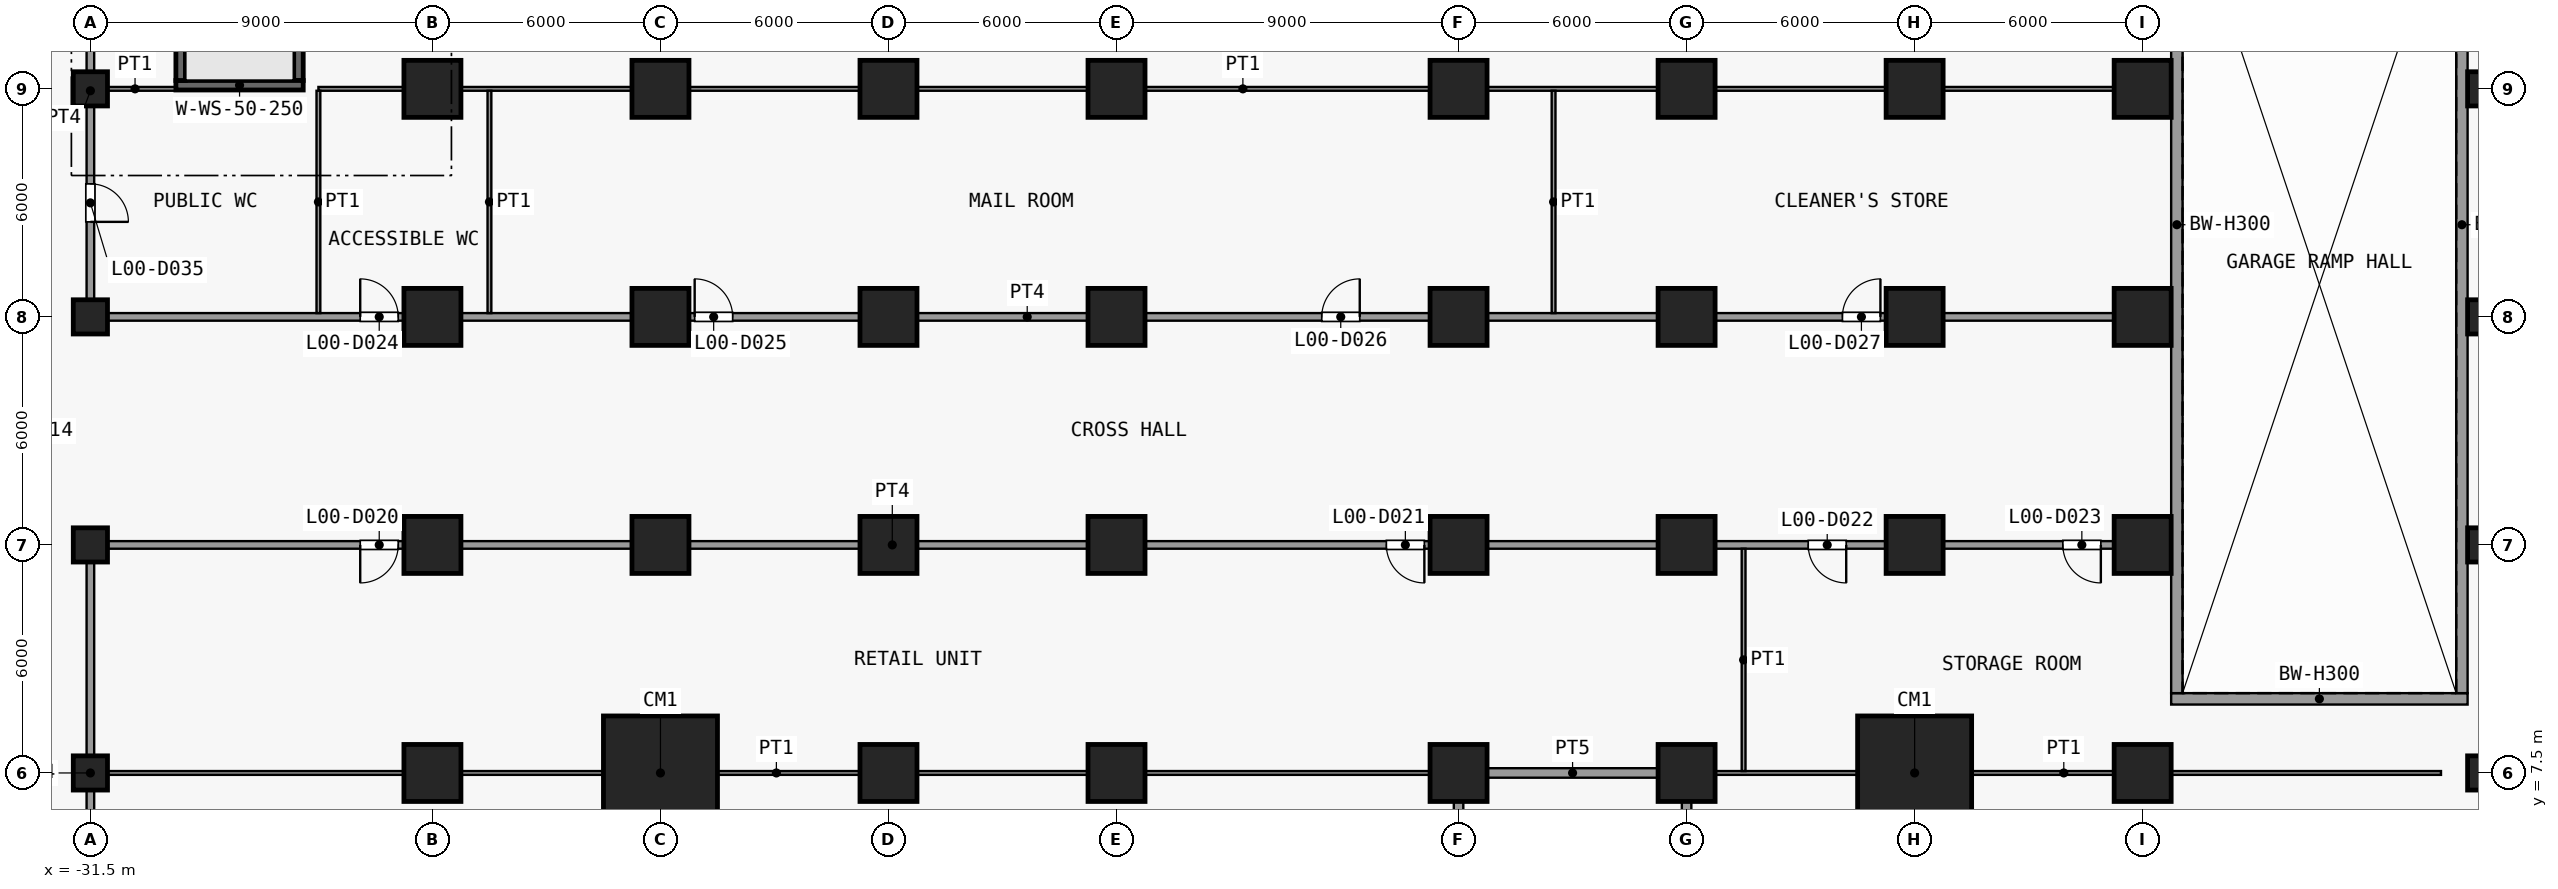
"""IFC4 building model, lengths in metres.
Left out: names, types, materials, properties, quantities, classifications, styles, units other than length and angle.
Written with IfcOpenShell. Run it as: python <this file> out.ifc"""

import sys

from ifc_helpers import new_model, si_unit, direction, frame, frame_2d, origin, origin_2d, place, context, subcontext, project, spatial, rectangle, extrude, element, fill, save


model = new_model("IFC4")
c1 = context("Model", 3, precision=1e-05, world=origin(), true_north=direction((0.0, 1.0)))
c2 = subcontext(c1, "Body", "Model", "MODEL_VIEW")
j1 = project(units=[si_unit("LENGTHUNIT", "METRE"), si_unit("PLANEANGLEUNIT", "RADIAN")], contexts=[c1])
p1 = place(None, origin())
s1 = spatial("IfcSite", under=j1, at=p1, CompositionType="ELEMENT")
p2 = place(p1, origin())
s2 = spatial("IfcBuilding", under=s1, at=p2, CompositionType="ELEMENT")
p3 = place(p2, origin())
s3 = spatial("IfcBuildingStorey", under=s2, at=p3, CompositionType="ELEMENT", Elevation=0.0)
for number, where, z_axis, x_axis in (
    (1, (-31.5, 7.5, 0.0), (0.0, 0.0, 1.0), (1.0, 0.0, 0.0)),
    (2, (-31.5, 13.5, 0.0), (0.0, 0.0, 1.0), (1.0, 0.0, 0.0)),
    (3, (-31.5, 19.5, 0.0), (0.0, 0.0, 1.0), (1.0, 0.0, 0.0)),
    (4, (-31.5, 25.5, 0.0), (0.0, 0.0, 1.0), (1.0, 0.0, 0.0)),
):
    element("IfcColumn", number, at=place(p3, frame(where, z_axis=z_axis, x_axis=x_axis)), inside=s3, PredefinedType="COLUMN", context=c2, shape_type="SweptSolid", body=[
        extrude(rectangle(XDim=0.9, YDim=0.9, at=origin_2d()), origin(), (0.0, 0.0, 1.0), 8.0),
    ])
for number, where, z_axis, x_axis in (
    (5, (-22.5, 7.5, 0.0), (0.0, 0.0, 1.0), (1.0, 0.0, 0.0)),
    (6, (-22.5, 13.5, 0.0), (0.0, 0.0, 1.0), (1.0, 0.0, 0.0)),
    (7, (-22.5, 19.5, 0.0), (0.0, 0.0, 1.0), (1.0, 0.0, 0.0)),
    (8, (-22.5, 25.5, 0.0), (0.0, 0.0, 1.0), (1.0, 0.0, 0.0)),
):
    element("IfcColumn", number, at=place(p3, frame(where, z_axis=z_axis, x_axis=x_axis)), inside=s3, PredefinedType="COLUMN", context=c2, shape_type="SweptSolid", body=[
        extrude(rectangle(XDim=1.5, YDim=1.5, at=origin_2d()), origin(), (0.0, 0.0, 1.0), 8.0),
    ])
p4 = place(p3, frame((-16.5, 7.5, 0.0), z_axis=(0.0, 0.0, 1.0), x_axis=(1.0, 0.0, 0.0)))
e9 = element("IfcColumn", 9, at=p4, inside=s3, PredefinedType="COLUMN", context=c2, shape_type="SweptSolid", body=[
    extrude(rectangle(XDim=3.0, YDim=3.0, at=origin_2d()), origin(), (0.0, 0.0, 1.0), 8.0),
])
for number, where, z_axis, x_axis in (
    (10, (-16.5, 13.5, 0.0), (0.0, 0.0, 1.0), (1.0, 0.0, 0.0)),
    (11, (-16.5, 19.5, 0.0), (0.0, 0.0, 1.0), (1.0, 0.0, 0.0)),
    (12, (-16.5, 25.5, 0.0), (0.0, 0.0, 1.0), (1.0, 0.0, 0.0)),
    (13, (-10.5, 7.5, 0.0), (0.0, 0.0, 1.0), (1.0, 0.0, 0.0)),
    (14, (-10.5, 13.5, 0.0), (0.0, 0.0, 1.0), (1.0, 0.0, 0.0)),
    (15, (-10.5, 19.5, 0.0), (0.0, 0.0, 1.0), (1.0, 0.0, 0.0)),
    (16, (-10.5, 25.5, 0.0), (0.0, 0.0, 1.0), (1.0, 0.0, 0.0)),
    (17, (-4.5, 7.5, 0.0), (0.0, 0.0, 1.0), (1.0, 0.0, 0.0)),
    (18, (-4.5, 13.5, 0.0), (0.0, 0.0, 1.0), (1.0, 0.0, 0.0)),
    (19, (-4.5, 19.5, 0.0), (0.0, 0.0, 1.0), (1.0, 0.0, 0.0)),
    (20, (-4.5, 25.5, 0.0), (0.0, 0.0, 1.0), (1.0, 0.0, 0.0)),
    (21, (4.5, 7.5, 0.0), (0.0, 0.0, 1.0), (1.0, 0.0, 0.0)),
    (22, (4.5, 13.5, 0.0), (0.0, 0.0, 1.0), (1.0, 0.0, 0.0)),
    (23, (4.5, 19.5, 0.0), (0.0, 0.0, 1.0), (1.0, 0.0, 0.0)),
    (24, (4.5, 25.5, 0.0), (0.0, 0.0, 1.0), (1.0, 0.0, 0.0)),
    (25, (10.5, 7.5, 0.0), (0.0, 0.0, 1.0), (1.0, 0.0, 0.0)),
    (26, (10.5, 13.5, 0.0), (0.0, 0.0, 1.0), (1.0, 0.0, 0.0)),
    (27, (10.5, 19.5, 0.0), (0.0, 0.0, 1.0), (1.0, 0.0, 0.0)),
    (28, (10.5, 25.5, 0.0), (0.0, 0.0, 1.0), (1.0, 0.0, 0.0)),
):
    element("IfcColumn", number, at=place(p3, frame(where, z_axis=z_axis, x_axis=x_axis)), inside=s3, PredefinedType="COLUMN", context=c2, shape_type="SweptSolid", body=[
        extrude(rectangle(XDim=1.5, YDim=1.5, at=origin_2d()), origin(), (0.0, 0.0, 1.0), 8.0),
    ])
p5 = place(p3, frame((16.5, 7.5, 0.0), z_axis=(0.0, 0.0, 1.0), x_axis=(1.0, 0.0, 0.0)))
e29 = element("IfcColumn", 29, at=p5, inside=s3, PredefinedType="COLUMN", context=c2, shape_type="SweptSolid", body=[
    extrude(rectangle(XDim=3.0, YDim=3.0, at=origin_2d()), origin(), (0.0, 0.0, 1.0), 8.0),
])
for number, where, z_axis, x_axis in (
    (30, (16.5, 13.5, 0.0), (0.0, 0.0, 1.0), (1.0, 0.0, 0.0)),
    (31, (16.5, 19.5, 0.0), (0.0, 0.0, 1.0), (1.0, 0.0, 0.0)),
    (32, (16.5, 25.5, 0.0), (0.0, 0.0, 1.0), (1.0, 0.0, 0.0)),
    (33, (22.5, 7.5, 0.0), (0.0, 0.0, 1.0), (1.0, 0.0, 0.0)),
    (34, (22.5, 13.5, 0.0), (0.0, 0.0, 1.0), (1.0, 0.0, 0.0)),
    (35, (22.5, 19.5, 0.0), (0.0, 0.0, 1.0), (1.0, 0.0, 0.0)),
    (36, (22.5, 25.5, 0.0), (0.0, 0.0, 1.0), (1.0, 0.0, 0.0)),
):
    element("IfcColumn", number, at=place(p3, frame(where, z_axis=z_axis, x_axis=x_axis)), inside=s3, PredefinedType="COLUMN", context=c2, shape_type="SweptSolid", body=[
        extrude(rectangle(XDim=1.5, YDim=1.5, at=origin_2d()), origin(), (0.0, 0.0, 1.0), 8.0),
    ])
for number, where, z_axis, x_axis in (
    (37, (31.5, 7.5, 0.0), (0.0, 0.0, 1.0), (1.0, 0.0, 0.0)),
    (38, (31.5, 13.5, 0.0), (0.0, 0.0, 1.0), (1.0, 0.0, 0.0)),
    (39, (31.5, 19.5, 0.0), (0.0, 0.0, 1.0), (1.0, 0.0, 0.0)),
    (40, (31.5, 25.5, 0.0), (0.0, 0.0, 1.0), (1.0, 0.0, 0.0)),
):
    element("IfcColumn", number, at=place(p3, frame(where, z_axis=z_axis, x_axis=x_axis)), inside=s3, PredefinedType="COLUMN", context=c2, shape_type="SweptSolid", body=[
        extrude(rectangle(XDim=0.9, YDim=0.9, at=origin_2d()), origin(), (0.0, 0.0, 1.0), 8.0),
    ])
p6 = place(p3, frame((23.25, 9.45, 0.0), z_axis=(0.0, 0.0, 1.0), x_axis=(1.0, 0.0, 0.0)))
e41 = element("IfcWall", 41, at=p6, inside=s3, PredefinedType="SOLIDWALL", context=c2, shape_type="SweptSolid", body=[
    extrude(rectangle(XDim=7.8, YDim=0.3, at=frame_2d((3.9, 0.0))), origin(), (0.0, 0.0, 1.0), 7.65),
])
for number, where, z_axis, x_axis in (
    (42, (23.4, 9.6, 0.0), (0.0, 0.0, 1.0), (0.0, 1.0, 0.0)),
    (43, (30.9, 9.6, 0.0), (0.0, 0.0, 1.0), (0.0, 1.0, 0.0)),
):
    element("IfcWall", number, at=place(p3, frame(where, z_axis=z_axis, x_axis=x_axis)), inside=s3, PredefinedType="SOLIDWALL", context=c2, shape_type="SweptSolid", body=[
        extrude(rectangle(XDim=24.65, YDim=0.3, at=frame_2d((12.325, 0.0))), origin(), (0.0, 0.0, 1.0), 7.65),
    ])
for number, where, z_axis, x_axis in (
    (44, (-29.125, 25.72, 0.0), (0.0, 0.0, 1.0), (0.0, 1.0, 0.0)),
    (45, (-26.025, 25.72, 0.0), (0.0, 0.0, 1.0), (0.0, 1.0, 0.0)),
):
    element("IfcWall", number, at=place(p3, frame(where, z_axis=z_axis, x_axis=x_axis)), inside=s3, PredefinedType="SHEAR", context=c2, shape_type="SweptSolid", body=[
        extrude(rectangle(XDim=1.35, YDim=0.25, at=frame_2d((0.675, 0.0))), origin(), (0.0, 0.0, 1.0), 7.65),
    ])
p7 = place(p3, frame((-29.25, 25.595, 0.0), z_axis=(0.0, 0.0, 1.0), x_axis=(1.0, 0.0, 0.0)))
e46 = element("IfcWall", 46, at=p7, inside=s3, PredefinedType="SHEAR", context=c2, shape_type="SweptSolid", body=[
    extrude(rectangle(XDim=3.35, YDim=0.25, at=frame_2d((1.675, 0.0))), origin(), (0.0, 0.0, 1.0), 7.65),
])
p8 = place(p3, frame((-31.4, 7.5, 0.0), z_axis=(0.0, 0.0, 1.0), x_axis=(1.0, 0.0, 0.0)))
e47 = element("IfcWall", 47, at=p8, inside=s3, PredefinedType="PARTITIONING", context=c2, shape_type="SweptSolid", body=[
    extrude(rectangle(XDim=35.9, YDim=0.1, at=frame_2d((17.95, 0.0))), origin(), (0.0, 0.0, 1.0), 7.65),
])
p9 = place(p3, frame((10.5, 7.5, 0.0), z_axis=(0.0, 0.0, 1.0), x_axis=(1.0, 0.0, 0.0)))
e48 = element("IfcWall", 48, at=p9, inside=s3, PredefinedType="PARTITIONING", context=c2, shape_type="SweptSolid", body=[
    extrude(rectangle(XDim=19.85, YDim=0.1, at=frame_2d((9.925, 0.0))), origin(), (0.0, 0.0, 1.0), 7.65),
])
p10 = place(p3, frame((4.5, 7.5, 0.0), z_axis=(0.0, 0.0, 1.0), x_axis=(1.0, 0.0, 0.0)))
e49 = element("IfcWall", 49, at=p10, inside=s3, PredefinedType="PARTITIONING", context=c2, shape_type="SweptSolid", body=[
    extrude(rectangle(XDim=6.0, YDim=0.25, at=frame_2d((3.0, 0.0))), origin(), (0.0, 0.0, 1.0), 7.65),
])
p11 = place(p3, frame((-31.6, 13.5, 0.0), z_axis=(0.0, 0.0, 1.0), x_axis=(1.0, 0.0, 0.0)))
e50 = element("IfcWall", 50, at=p11, inside=s3, PredefinedType="PARTITIONING", context=c2, shape_type="SweptSolid", body=[
    extrude(rectangle(XDim=54.75, YDim=0.2, at=frame_2d((27.375, 0.0))), origin(), (0.0, 0.0, 1.0), 7.65),
])
p12 = place(p11, frame((7.2, 0.0, 0.0)))
e51 = element("IfcOpeningElement", 51, at=p12, cuts=e50, PredefinedType="OPENING", context=c2, shape_type="SweptSolid", body=[
    extrude(rectangle(XDim=1.0, YDim=2.1, at=frame_2d((0.5, 1.05))), frame((0.0, 0.11, 0.0), z_axis=(0.0, -1.0, 0.0), x_axis=(1.0, 0.0, 0.0)), (0.0, 0.0, 1.0), 0.22),
])
p13 = place(p11, frame((34.2, 0.0, 0.0)))
e52 = element("IfcOpeningElement", 52, at=p13, cuts=e50, PredefinedType="OPENING", context=c2, shape_type="SweptSolid", body=[
    extrude(rectangle(XDim=1.0, YDim=2.1, at=frame_2d((0.5, 1.05))), frame((0.0, 0.11, 0.0), z_axis=(0.0, -1.0, 0.0), x_axis=(1.0, 0.0, 0.0)), (0.0, 0.0, 1.0), 0.22),
])
p14 = place(p11, frame((45.3, 0.0, 0.0)))
e53 = element("IfcOpeningElement", 53, at=p14, cuts=e50, PredefinedType="OPENING", context=c2, shape_type="SweptSolid", body=[
    extrude(rectangle(XDim=1.0, YDim=2.1, at=frame_2d((0.5, 1.05))), frame((0.0, 0.11, 0.0), z_axis=(0.0, -1.0, 0.0), x_axis=(1.0, 0.0, 0.0)), (0.0, 0.0, 1.0), 0.22),
])
p15 = place(p11, frame((52.0, 0.0, 0.0)))
e54 = element("IfcOpeningElement", 54, at=p15, cuts=e50, PredefinedType="OPENING", context=c2, shape_type="SweptSolid", body=[
    extrude(rectangle(XDim=1.0, YDim=2.1, at=frame_2d((0.5, 1.05))), frame((0.0, 0.11, 0.0), z_axis=(0.0, -1.0, 0.0), x_axis=(1.0, 0.0, 0.0)), (0.0, 0.0, 1.0), 0.22),
])
p16 = place(p3, frame((-31.6, 19.5, 0.0), z_axis=(0.0, 0.0, 1.0), x_axis=(1.0, 0.0, 0.0)))
e55 = element("IfcWall", 55, at=p16, inside=s3, PredefinedType="PARTITIONING", context=c2, shape_type="SweptSolid", body=[
    extrude(rectangle(XDim=54.75, YDim=0.2, at=frame_2d((27.375, 0.0))), origin(), (0.0, 0.0, 1.0), 7.65),
])
p17 = place(p16, frame((7.2, 0.0, 0.0)))
e56 = element("IfcOpeningElement", 56, at=p17, cuts=e55, PredefinedType="OPENING", context=c2, shape_type="SweptSolid", body=[
    extrude(rectangle(XDim=1.0, YDim=2.1, at=frame_2d((0.5, 1.05))), frame((0.0, 0.11, 0.0), z_axis=(0.0, -1.0, 0.0), x_axis=(1.0, 0.0, 0.0)), (0.0, 0.0, 1.0), 0.22),
])
p18 = place(p16, frame((16.0, 0.0, 0.0)))
e57 = element("IfcOpeningElement", 57, at=p18, cuts=e55, PredefinedType="OPENING", context=c2, shape_type="SweptSolid", body=[
    extrude(rectangle(XDim=1.0, YDim=2.1, at=frame_2d((0.5, 1.05))), frame((0.0, 0.11, 0.0), z_axis=(0.0, -1.0, 0.0), x_axis=(1.0, 0.0, 0.0)), (0.0, 0.0, 1.0), 0.22),
])
p19 = place(p16, frame((32.5, 0.0, 0.0)))
e58 = element("IfcOpeningElement", 58, at=p19, cuts=e55, PredefinedType="OPENING", context=c2, shape_type="SweptSolid", body=[
    extrude(rectangle(XDim=1.0, YDim=2.1, at=frame_2d((0.5, 1.05))), frame((0.0, 0.11, 0.0), z_axis=(0.0, -1.0, 0.0), x_axis=(1.0, 0.0, 0.0)), (0.0, 0.0, 1.0), 0.22),
])
p20 = place(p16, frame((46.2, 0.0, 0.0)))
e59 = element("IfcOpeningElement", 59, at=p20, cuts=e55, PredefinedType="OPENING", context=c2, shape_type="SweptSolid", body=[
    extrude(rectangle(XDim=1.0, YDim=2.1, at=frame_2d((0.5, 1.05))), frame((0.0, 0.11, 0.0), z_axis=(0.0, -1.0, 0.0), x_axis=(1.0, 0.0, 0.0)), (0.0, 0.0, 1.0), 0.22),
])
p21 = place(p3, frame((-31.4, 25.5, 0.0), z_axis=(0.0, 0.0, 1.0), x_axis=(1.0, 0.0, 0.0)))
e60 = element("IfcWall", 60, at=p21, inside=s3, PredefinedType="PARTITIONING", context=c2, shape_type="SweptSolid", body=[
    extrude(rectangle(XDim=2.15, YDim=0.1, at=frame_2d((1.075, 0.0))), origin(), (0.0, 0.0, 1.0), 7.65),
])
p22 = place(p3, frame((-25.5, 25.5, 0.0), z_axis=(0.0, 0.0, 1.0), x_axis=(1.0, 0.0, 0.0)))
e61 = element("IfcWall", 61, at=p22, inside=s3, PredefinedType="PARTITIONING", context=c2, shape_type="SweptSolid", body=[
    extrude(rectangle(XDim=48.65, YDim=0.1, at=frame_2d((24.325, 0.0))), origin(), (0.0, 0.0, 1.0), 7.65),
])
p23 = place(p3, frame((-31.5, 1.6, 0.0), z_axis=(0.0, 0.0, 1.0), x_axis=(0.0, 1.0, 0.0)))
e62 = element("IfcWall", 62, at=p23, inside=s3, PredefinedType="PARTITIONING", context=c2, shape_type="SweptSolid", body=[
    extrude(rectangle(XDim=11.8, YDim=0.2, at=frame_2d((5.9, 0.0))), origin(), (0.0, 0.0, 1.0), 7.65),
])
p24 = place(p3, frame((-31.5, 19.6, 0.0), z_axis=(0.0, 0.0, 1.0), x_axis=(0.0, 1.0, 0.0)))
e63 = element("IfcWall", 63, at=p24, inside=s3, PredefinedType="PARTITIONING", context=c2, shape_type="SweptSolid", body=[
    extrude(rectangle(XDim=11.8, YDim=0.2, at=frame_2d((5.9, 0.0))), origin(), (0.0, 0.0, 1.0), 7.65),
])
p25 = place(p24, frame((2.4, 0.0, 0.0)))
e64 = element("IfcOpeningElement", 64, at=p25, cuts=e63, PredefinedType="OPENING", context=c2, shape_type="SweptSolid", body=[
    extrude(rectangle(XDim=1.0, YDim=2.1, at=frame_2d((0.5, 1.05))), frame((0.0, 0.11, 0.0), z_axis=(0.0, -1.0, 0.0), x_axis=(1.0, 0.0, 0.0)), (0.0, 0.0, 1.0), 0.22),
])
p26 = place(p24, frame((8.3, 0.0, 0.0)))
e65 = element("IfcOpeningElement", 65, at=p26, cuts=e63, PredefinedType="OPENING", context=c2, shape_type="SweptSolid", body=[
    extrude(rectangle(XDim=1.0, YDim=2.1, at=frame_2d((0.5, 1.05))), frame((0.0, 0.11, 0.0), z_axis=(0.0, -1.0, 0.0), x_axis=(1.0, 0.0, 0.0)), (0.0, 0.0, 1.0), 0.22),
])
for number, where, z_axis, x_axis in (
    (66, (-25.5, 19.6, 0.0), (0.0, 0.0, 1.0), (0.0, 1.0, 0.0)),
    (67, (-21.0, 19.6, 0.0), (0.0, 0.0, 1.0), (0.0, 1.0, 0.0)),
):
    element("IfcWall", number, at=place(p3, frame(where, z_axis=z_axis, x_axis=x_axis)), inside=s3, PredefinedType="PARTITIONING", context=c2, shape_type="SweptSolid", body=[
        extrude(rectangle(XDim=5.85, YDim=0.1, at=frame_2d((2.925, 0.0))), origin(), (0.0, 0.0, 1.0), 7.65),
    ])
p27 = place(p3, frame((4.5, 1.625, 0.0), z_axis=(0.0, 0.0, 1.0), x_axis=(0.0, 1.0, 0.0)))
e68 = element("IfcWall", 68, at=p27, inside=s3, PredefinedType="PARTITIONING", context=c2, shape_type="SweptSolid", body=[
    extrude(rectangle(XDim=5.75, YDim=0.25, at=frame_2d((2.875, 0.0))), origin(), (0.0, 0.0, 1.0), 7.65),
])
p28 = place(p3, frame((7.0, 19.6, 0.0), z_axis=(0.0, 0.0, 1.0), x_axis=(0.0, 1.0, 0.0)))
e69 = element("IfcWall", 69, at=p28, inside=s3, PredefinedType="PARTITIONING", context=c2, shape_type="SweptSolid", body=[
    extrude(rectangle(XDim=5.85, YDim=0.1, at=frame_2d((2.925, 0.0))), origin(), (0.0, 0.0, 1.0), 7.65),
])
p29 = place(p3, frame((10.5, 1.625, 0.0), z_axis=(0.0, 0.0, 1.0), x_axis=(0.0, 1.0, 0.0)))
e70 = element("IfcWall", 70, at=p29, inside=s3, PredefinedType="PARTITIONING", context=c2, shape_type="SweptSolid", body=[
    extrude(rectangle(XDim=5.75, YDim=0.25, at=frame_2d((2.875, 0.0))), origin(), (0.0, 0.0, 1.0), 7.65),
])
p30 = place(p3, frame((12.0, 7.55, 0.0), z_axis=(0.0, 0.0, 1.0), x_axis=(0.0, 1.0, 0.0)))
e71 = element("IfcWall", 71, at=p30, inside=s3, PredefinedType="PARTITIONING", context=c2, shape_type="SweptSolid", body=[
    extrude(rectangle(XDim=5.85, YDim=0.1, at=frame_2d((2.925, 0.0))), origin(), (0.0, 0.0, 1.0), 7.65),
])
p31 = place(p12, origin())
e72 = element("IfcDoor", 72, at=p31, inside=s3, OperationType="SINGLE_SWING_LEFT", PredefinedType="DOOR", context=c2, shape_type="SweptSolid", body=[
    extrude(rectangle(XDim=1.0, YDim=2.1, at=frame_2d((0.5, 1.05))), frame((0.0, 0.025, 0.0), z_axis=(0.0, -1.0, 0.0), x_axis=(1.0, 0.0, 0.0)), (0.0, 0.0, 1.0), 0.05),
])
fill(e51, e72)
p32 = place(p13, origin())
e73 = element("IfcDoor", 73, at=p32, inside=s3, OperationType="SINGLE_SWING_RIGHT", PredefinedType="DOOR", context=c2, shape_type="SweptSolid", body=[
    extrude(rectangle(XDim=1.0, YDim=2.1, at=frame_2d((0.5, 1.05))), frame((0.0, 0.025, 0.0), z_axis=(0.0, -1.0, 0.0), x_axis=(1.0, 0.0, 0.0)), (0.0, 0.0, 1.0), 0.05),
])
fill(e52, e73)
p33 = place(p14, origin())
e74 = element("IfcDoor", 74, at=p33, inside=s3, OperationType="SINGLE_SWING_RIGHT", PredefinedType="DOOR", context=c2, shape_type="SweptSolid", body=[
    extrude(rectangle(XDim=1.0, YDim=2.1, at=frame_2d((0.5, 1.05))), frame((0.0, 0.025, 0.0), z_axis=(0.0, -1.0, 0.0), x_axis=(1.0, 0.0, 0.0)), (0.0, 0.0, 1.0), 0.05),
])
fill(e53, e74)
p34 = place(p15, origin())
e75 = element("IfcDoor", 75, at=p34, inside=s3, OperationType="SINGLE_SWING_RIGHT", PredefinedType="DOOR", context=c2, shape_type="SweptSolid", body=[
    extrude(rectangle(XDim=1.0, YDim=2.1, at=frame_2d((0.5, 1.05))), frame((0.0, 0.025, 0.0), z_axis=(0.0, -1.0, 0.0), x_axis=(1.0, 0.0, 0.0)), (0.0, 0.0, 1.0), 0.05),
])
fill(e54, e75)
p35 = place(p17, origin())
e76 = element("IfcDoor", 76, at=p35, inside=s3, OperationType="SINGLE_SWING_RIGHT", PredefinedType="DOOR", context=c2, shape_type="SweptSolid", body=[
    extrude(rectangle(XDim=1.0, YDim=2.1, at=frame_2d((0.5, 1.05))), frame((0.0, 0.025, 0.0), z_axis=(0.0, -1.0, 0.0), x_axis=(1.0, 0.0, 0.0)), (0.0, 0.0, 1.0), 0.05),
])
fill(e56, e76)
p36 = place(p18, origin())
e77 = element("IfcDoor", 77, at=p36, inside=s3, OperationType="SINGLE_SWING_RIGHT", PredefinedType="DOOR", context=c2, shape_type="SweptSolid", body=[
    extrude(rectangle(XDim=1.0, YDim=2.1, at=frame_2d((0.5, 1.05))), frame((0.0, 0.025, 0.0), z_axis=(0.0, -1.0, 0.0), x_axis=(1.0, 0.0, 0.0)), (0.0, 0.0, 1.0), 0.05),
])
fill(e57, e77)
p37 = place(p19, origin())
e78 = element("IfcDoor", 78, at=p37, inside=s3, OperationType="SINGLE_SWING_LEFT", PredefinedType="DOOR", context=c2, shape_type="SweptSolid", body=[
    extrude(rectangle(XDim=1.0, YDim=2.1, at=frame_2d((0.5, 1.05))), frame((0.0, 0.025, 0.0), z_axis=(0.0, -1.0, 0.0), x_axis=(1.0, 0.0, 0.0)), (0.0, 0.0, 1.0), 0.05),
])
fill(e58, e78)
p38 = place(p20, origin())
e79 = element("IfcDoor", 79, at=p38, inside=s3, OperationType="SINGLE_SWING_LEFT", PredefinedType="DOOR", context=c2, shape_type="SweptSolid", body=[
    extrude(rectangle(XDim=1.0, YDim=2.1, at=frame_2d((0.5, 1.05))), frame((0.0, 0.025, 0.0), z_axis=(0.0, -1.0, 0.0), x_axis=(1.0, 0.0, 0.0)), (0.0, 0.0, 1.0), 0.05),
])
fill(e59, e79)
p39 = place(p25, origin())
e80 = element("IfcDoor", 80, at=p39, inside=s3, OperationType="SINGLE_SWING_LEFT", PredefinedType="DOOR", context=c2, shape_type="SweptSolid", body=[
    extrude(rectangle(XDim=1.0, YDim=2.1, at=frame_2d((0.5, 1.05))), frame((0.0, 0.025, 0.0), z_axis=(0.0, -1.0, 0.0), x_axis=(1.0, 0.0, 0.0)), (0.0, 0.0, 1.0), 0.05),
])
fill(e64, e80)
save(model, sys.argv[1])
